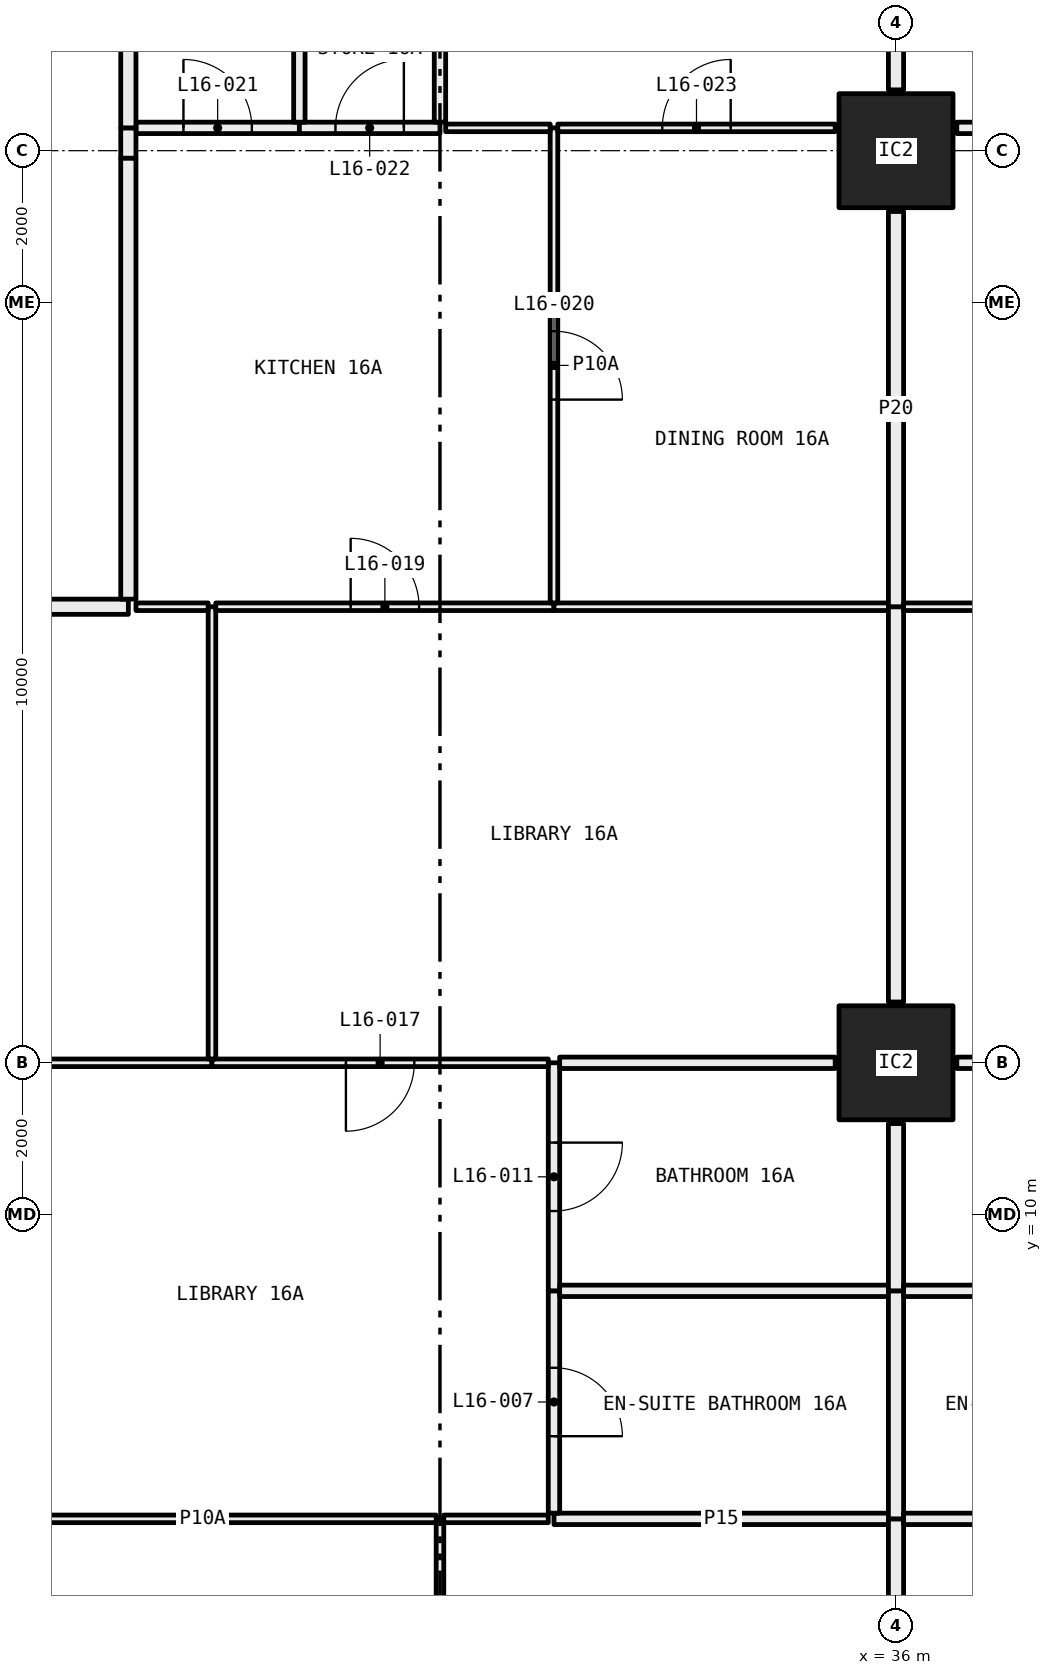
"""IFC4 building model, lengths in metres.
Left out: names, types, materials, properties, quantities, classifications, styles, units other than length and angle.
Written with IfcOpenShell. Run it as: python <this file> out.ifc"""

import sys

from ifc_helpers import new_model, si_unit, direction, frame, frame_2d, origin, origin_2d, place, context, subcontext, project, spatial, rectangle, hollow_rectangle, extrude, element, fill, save


model = new_model("IFC4")
c1 = context("Model", 3, precision=1e-05, world=origin(), true_north=direction((0.0, 1.0)))
c2 = subcontext(c1, "Body", "Model", "MODEL_VIEW")
j1 = project(units=[si_unit("LENGTHUNIT", "METRE"), si_unit("PLANEANGLEUNIT", "RADIAN")], contexts=[c1])
p1 = place(None, origin())
s1 = spatial("IfcSite", under=j1, at=p1, CompositionType="ELEMENT")
p2 = place(p1, origin())
s2 = spatial("IfcBuilding", under=s1, at=p2, CompositionType="ELEMENT")
p3 = place(p2, frame((0.0, 0.0, 67.95)))
s3 = spatial("IfcBuildingStorey", under=s2, at=p3, CompositionType="ELEMENT", Elevation=67.95)
for number, where, z_axis, x_axis in (
    (1, (36.0, 12.0, 0.0), (0.0, 0.0, 1.0), (1.0, 0.0, 0.0)),
    (2, (36.0, 24.0, 0.0), (0.0, 0.0, 1.0), (1.0, 0.0, 0.0)),
):
    element("IfcColumn", number, at=place(p3, frame(where, z_axis=z_axis, x_axis=x_axis)), inside=s3, PredefinedType="COLUMN", context=c2, shape_type="SweptSolid", body=[
        extrude(hollow_rectangle(XDim=1.5, YDim=1.5, WallThickness=0.065, at=origin_2d()), origin(), (0.0, 0.0, 1.0), 3.05),
    ])
p4 = place(p3, frame((30.0, 0.72, 0.0), z_axis=(0.0, 0.0, 1.0), x_axis=(0.0, 1.0, 0.0)))
e3 = element("IfcWall", 3, at=p4, inside=s3, PredefinedType="PARTITIONING", context=c2, shape_type="SweptSolid", body=[
    extrude(rectangle(XDim=5.28, YDim=0.1, at=frame_2d((2.64, 0.0))), origin(), (0.0, 0.0, 1.0), 3.05),
])
p5 = place(p4, frame((2.19, 0.0, 0.0)))
e4 = element("IfcOpeningElement", 4, at=p5, cuts=e3, PredefinedType="OPENING", context=c2, shape_type="SweptSolid", body=[
    extrude(rectangle(XDim=0.9, YDim=2.1, at=frame_2d((0.45, 1.05))), frame((0.0, 0.06, 0.0), z_axis=(0.0, -1.0, 0.0), x_axis=(1.0, 0.0, 0.0)), (0.0, 0.0, 1.0), 0.12),
])
p6 = place(p3, frame((29.95, 6.0, 0.0), z_axis=(0.0, 0.0, 1.0), x_axis=(-1.0, 0.0, 0.0)))
e5 = element("IfcWall", 5, at=p6, inside=s3, PredefinedType="PARTITIONING", context=c2, shape_type="SweptSolid", body=[
    extrude(rectangle(XDim=6.145, YDim=0.1, at=frame_2d((3.073, 0.0))), origin(), (0.0, 0.0, 1.0), 2.45),
])
p7 = place(p3, frame((31.425, 6.0, 0.0), z_axis=(0.0, 0.0, 1.0), x_axis=(-1.0, 0.0, 0.0)))
e6 = element("IfcWall", 6, at=p7, inside=s3, PredefinedType="PARTITIONING", context=c2, shape_type="SweptSolid", body=[
    extrude(rectangle(XDim=1.375, YDim=0.1, at=frame_2d((0.688, 0.0))), origin(), (0.0, 0.0, 1.0), 3.05),
])
p8 = place(p3, frame((35.9, 6.0, 0.0), z_axis=(0.0, 0.0, 1.0), x_axis=(-1.0, 0.0, 0.0)))
e7 = element("IfcWall", 7, at=p8, inside=s3, PredefinedType="PARTITIONING", context=c2, shape_type="SweptSolid", body=[
    extrude(rectangle(XDim=4.4, YDim=0.15, at=frame_2d((2.2, 0.0))), origin(), (0.0, 0.0, 1.0), 3.05),
])
p9 = place(p3, frame((36.0, 0.72, 0.0), z_axis=(0.0, 0.0, 1.0), x_axis=(0.0, 1.0, 0.0)))
e8 = element("IfcWall", 8, at=p9, inside=s3, PredefinedType="PARTITIONING", context=c2, shape_type="SweptSolid", body=[
    extrude(rectangle(XDim=5.28, YDim=0.2, at=frame_2d((2.64, 0.0))), origin(), (0.0, 0.0, 1.0), 2.45),
])
p10 = place(p3, frame((31.5, 6.075, 0.0), z_axis=(0.0, 0.0, 1.0), x_axis=(0.0, 1.0, 0.0)))
e9 = element("IfcWall", 9, at=p10, inside=s3, PredefinedType="PARTITIONING", context=c2, shape_type="SweptSolid", body=[
    extrude(rectangle(XDim=2.925, YDim=0.15, at=frame_2d((1.462, 0.0))), origin(), (0.0, 0.0, 1.0), 3.05),
])
p11 = place(p10, frame((1.012, 0.0, 0.0)))
e10 = element("IfcOpeningElement", 10, at=p11, cuts=e9, PredefinedType="OPENING", context=c2, shape_type="SweptSolid", body=[
    extrude(rectangle(XDim=0.9, YDim=2.1, at=frame_2d((0.45, 1.05))), frame((0.0, 0.085, 0.0), z_axis=(0.0, -1.0, 0.0), x_axis=(1.0, 0.0, 0.0)), (0.0, 0.0, 1.0), 0.17),
])
p12 = place(p3, frame((31.5, 9.0, 0.0), z_axis=(0.0, 0.0, 1.0), x_axis=(0.0, 1.0, 0.0)))
e11 = element("IfcWall", 11, at=p12, inside=s3, PredefinedType="PARTITIONING", context=c2, shape_type="SweptSolid", body=[
    extrude(rectangle(XDim=3.0, YDim=0.15, at=frame_2d((1.5, 0.0))), origin(), (0.0, 0.0, 1.0), 2.45),
])
p13 = place(p12, frame((1.05, 0.0, 0.0)))
e12 = element("IfcOpeningElement", 12, at=p13, cuts=e11, PredefinedType="OPENING", context=c2, shape_type="SweptSolid", body=[
    extrude(rectangle(XDim=0.9, YDim=2.1, at=frame_2d((0.45, 1.05))), frame((0.0, 0.085, 0.0), z_axis=(0.0, -1.0, 0.0), x_axis=(1.0, 0.0, 0.0)), (0.0, 0.0, 1.0), 0.17),
])
p14 = place(p3, frame((27.0, 12.0, 0.0), z_axis=(0.0, 0.0, 1.0), x_axis=(-1.0, 0.0, 0.0)))
e13 = element("IfcWall", 13, at=p14, inside=s3, PredefinedType="PARTITIONING", context=c2, shape_type="SweptSolid", body=[
    extrude(rectangle(XDim=2.2, YDim=0.1, at=frame_2d((1.1, 0.0))), origin(), (0.0, 0.0, 1.0), 2.45),
])
p15 = place(p3, frame((31.425, 12.0, 0.0), z_axis=(0.0, 0.0, 1.0), x_axis=(-1.0, 0.0, 0.0)))
e14 = element("IfcWall", 14, at=p15, inside=s3, PredefinedType="PARTITIONING", context=c2, shape_type="SweptSolid", body=[
    extrude(rectangle(XDim=4.425, YDim=0.1, at=frame_2d((2.212, 0.0))), origin(), (0.0, 0.0, 1.0), 2.45),
])
p16 = place(p15, frame((1.762, 0.0, 0.0)))
e15 = element("IfcOpeningElement", 15, at=p16, cuts=e14, PredefinedType="OPENING", context=c2, shape_type="SweptSolid", body=[
    extrude(rectangle(XDim=0.9, YDim=2.1, at=frame_2d((0.45, 1.05))), frame((0.0, 0.06, 0.0), z_axis=(0.0, -1.0, 0.0), x_axis=(1.0, 0.0, 0.0)), (0.0, 0.0, 1.0), 0.12),
])
p17 = place(p3, frame((35.9, 9.0, 0.0), z_axis=(0.0, 0.0, 1.0), x_axis=(-1.0, 0.0, 0.0)))
e16 = element("IfcWall", 16, at=p17, inside=s3, PredefinedType="PARTITIONING", context=c2, shape_type="SweptSolid", body=[
    extrude(rectangle(XDim=4.325, YDim=0.15, at=frame_2d((2.163, 0.0))), origin(), (0.0, 0.0, 1.0), 3.05),
])
p18 = place(p3, frame((36.0, 6.0, 0.0), z_axis=(0.0, 0.0, 1.0), x_axis=(0.0, 1.0, 0.0)))
e17 = element("IfcWall", 17, at=p18, inside=s3, PredefinedType="PARTITIONING", context=c2, shape_type="SweptSolid", body=[
    extrude(rectangle(XDim=3.0, YDim=0.2, at=frame_2d((1.5, 0.0))), origin(), (0.0, 0.0, 1.0), 2.45),
])
p19 = place(p3, frame((35.2, 12.0, 0.0), z_axis=(0.0, 0.0, 1.0), x_axis=(-1.0, 0.0, 0.0)))
e18 = element("IfcWall", 18, at=p19, inside=s3, PredefinedType="PARTITIONING", context=c2, shape_type="SweptSolid", body=[
    extrude(rectangle(XDim=3.625, YDim=0.15, at=frame_2d((1.812, 0.0))), origin(), (0.0, 0.0, 1.0), 2.45),
])
p20 = place(p3, frame((36.0, 9.0, 0.0), z_axis=(0.0, 0.0, 1.0), x_axis=(0.0, 1.0, 0.0)))
e19 = element("IfcWall", 19, at=p20, inside=s3, PredefinedType="PARTITIONING", context=c2, shape_type="SweptSolid", body=[
    extrude(rectangle(XDim=2.2, YDim=0.2, at=frame_2d((1.1, 0.0))), origin(), (0.0, 0.0, 1.0), 2.45),
])
p21 = place(p3, frame((27.0, 12.05, 0.0), z_axis=(0.0, 0.0, 1.0), x_axis=(0.0, 1.0, 0.0)))
e20 = element("IfcWall", 20, at=p21, inside=s3, PredefinedType="PARTITIONING", context=c2, shape_type="SweptSolid", body=[
    extrude(rectangle(XDim=5.95, YDim=0.1, at=frame_2d((2.975, 0.0))), origin(), (0.0, 0.0, 1.0), 2.45),
])
p22 = place(p3, frame((26.95, 18.0, 0.0), z_axis=(0.0, 0.0, 1.0), x_axis=(-1.0, 0.0, 0.0)))
e21 = element("IfcWall", 21, at=p22, inside=s3, PredefinedType="PARTITIONING", context=c2, shape_type="SweptSolid", body=[
    extrude(rectangle(XDim=0.95, YDim=0.1, at=frame_2d((0.475, 0.0))), origin(), (0.0, 0.0, 1.0), 3.05),
])
p23 = place(p3, frame((25.9, 18.0, 0.0), z_axis=(0.0, 0.0, 1.0), x_axis=(-1.0, 0.0, 0.0)))
e22 = element("IfcWall", 22, at=p23, inside=s3, PredefinedType="PARTITIONING", context=c2, shape_type="SweptSolid", body=[
    extrude(rectangle(XDim=7.9, YDim=0.2, at=frame_2d((3.95, 0.0))), origin(), (0.0, 0.0, 1.0), 3.05),
])
p24 = place(p3, frame((31.5, 18.0, 0.0), z_axis=(0.0, 0.0, 1.0), x_axis=(-1.0, 0.0, 0.0)))
e23 = element("IfcWall", 23, at=p24, inside=s3, PredefinedType="PARTITIONING", context=c2, shape_type="SweptSolid", body=[
    extrude(rectangle(XDim=4.45, YDim=0.1, at=frame_2d((2.225, 0.0))), origin(), (0.0, 0.0, 1.0), 3.05),
])
p25 = place(p24, frame((1.775, 0.0, 0.0)))
e24 = element("IfcOpeningElement", 24, at=p25, cuts=e23, PredefinedType="OPENING", context=c2, shape_type="SweptSolid", body=[
    extrude(rectangle(XDim=0.9, YDim=2.1, at=frame_2d((0.45, 1.05))), frame((0.0, 0.06, 0.0), z_axis=(0.0, -1.0, 0.0), x_axis=(1.0, 0.0, 0.0)), (0.0, 0.0, 1.0), 0.12),
])
p26 = place(p3, frame((35.9, 18.0, 0.0), z_axis=(0.0, 0.0, 1.0), x_axis=(-1.0, 0.0, 0.0)))
e25 = element("IfcWall", 25, at=p26, inside=s3, PredefinedType="PARTITIONING", context=c2, shape_type="SweptSolid", body=[
    extrude(rectangle(XDim=4.4, YDim=0.1, at=frame_2d((2.2, 0.0))), origin(), (0.0, 0.0, 1.0), 3.05),
])
p27 = place(p3, frame((36.0, 12.8, 0.0), z_axis=(0.0, 0.0, 1.0), x_axis=(0.0, 1.0, 0.0)))
e26 = element("IfcWall", 26, at=p27, inside=s3, PredefinedType="PARTITIONING", context=c2, shape_type="SweptSolid", body=[
    extrude(rectangle(XDim=5.2, YDim=0.2, at=frame_2d((2.6, 0.0))), origin(), (0.0, 0.0, 1.0), 2.45),
])
p28 = place(p3, frame((31.5, 18.05, 0.0), z_axis=(0.0, 0.0, 1.0), x_axis=(0.0, 1.0, 0.0)))
e27 = element("IfcWall", 27, at=p28, inside=s3, PredefinedType="PARTITIONING", context=c2, shape_type="SweptSolid", body=[
    extrude(rectangle(XDim=6.25, YDim=0.1, at=frame_2d((3.125, 0.0))), origin(), (0.0, 0.0, 1.0), 2.45),
])
p29 = place(p28, frame((2.675, 0.0, 0.0)))
e28 = element("IfcOpeningElement", 28, at=p29, cuts=e27, PredefinedType="OPENING", context=c2, shape_type="SweptSolid", body=[
    extrude(rectangle(XDim=0.9, YDim=2.1, at=frame_2d((0.45, 1.05))), frame((0.0, 0.06, 0.0), z_axis=(0.0, -1.0, 0.0), x_axis=(1.0, 0.0, 0.0)), (0.0, 0.0, 1.0), 0.12),
])
p30 = place(p3, frame((28.15, 24.3, 0.0), z_axis=(0.0, 0.0, 1.0), x_axis=(-1.0, 0.0, 0.0)))
e29 = element("IfcWall", 29, at=p30, inside=s3, PredefinedType="PARTITIONING", context=c2, shape_type="SweptSolid", body=[
    extrude(rectangle(XDim=2.15, YDim=0.15, at=frame_2d((1.075, 0.0))), origin(), (0.0, 0.0, 1.0), 3.05),
])
p31 = place(p30, frame((0.625, 0.0, 0.0)))
e30 = element("IfcOpeningElement", 30, at=p31, cuts=e29, PredefinedType="OPENING", context=c2, shape_type="SweptSolid", body=[
    extrude(rectangle(XDim=0.9, YDim=2.1, at=frame_2d((0.45, 1.05))), frame((0.0, 0.085, 0.0), z_axis=(0.0, -1.0, 0.0), x_axis=(1.0, 0.0, 0.0)), (0.0, 0.0, 1.0), 0.17),
])
p32 = place(p3, frame((30.0, 24.3, 0.0), z_axis=(0.0, 0.0, 1.0), x_axis=(-1.0, 0.0, 0.0)))
e31 = element("IfcWall", 31, at=p32, inside=s3, PredefinedType="PARTITIONING", context=c2, shape_type="SweptSolid", body=[
    extrude(rectangle(XDim=1.85, YDim=0.15, at=frame_2d((0.925, 0.0))), origin(), (0.0, 0.0, 1.0), 3.05),
])
p33 = place(p32, frame((0.475, 0.0, 0.0)))
e32 = element("IfcOpeningElement", 32, at=p33, cuts=e31, PredefinedType="OPENING", context=c2, shape_type="SweptSolid", body=[
    extrude(rectangle(XDim=0.9, YDim=2.1, at=frame_2d((0.45, 1.05))), frame((0.0, 0.085, 0.0), z_axis=(0.0, -1.0, 0.0), x_axis=(1.0, 0.0, 0.0)), (0.0, 0.0, 1.0), 0.17),
])
p34 = place(p3, frame((31.45, 24.3, 0.0), z_axis=(0.0, 0.0, 1.0), x_axis=(-1.0, 0.0, 0.0)))
e33 = element("IfcWall", 33, at=p34, inside=s3, PredefinedType="PARTITIONING", context=c2, shape_type="SweptSolid", body=[
    extrude(rectangle(XDim=1.375, YDim=0.1, at=frame_2d((0.688, 0.0))), origin(), (0.0, 0.0, 1.0), 3.05),
])
p35 = place(p3, frame((25.9, 24.3, 0.0), z_axis=(0.0, 0.0, 1.0), x_axis=(0.0, -1.0, 0.0)))
e34 = element("IfcWall", 34, at=p35, inside=s3, PredefinedType="PARTITIONING", context=c2, shape_type="SweptSolid", body=[
    extrude(rectangle(XDim=0.4, YDim=0.2, at=frame_2d((0.2, 0.0))), origin(), (0.0, 0.0, 1.0), 2.45),
])
p36 = place(p3, frame((25.9, 23.9, 0.0), z_axis=(0.0, 0.0, 1.0), x_axis=(0.0, -1.0, 0.0)))
e35 = element("IfcWall", 35, at=p36, inside=s3, PredefinedType="PARTITIONING", context=c2, shape_type="SweptSolid", body=[
    extrude(rectangle(XDim=5.8, YDim=0.2, at=frame_2d((2.9, 0.0))), origin(), (0.0, 0.0, 1.0), 3.05),
])
p37 = place(p3, frame((35.2, 24.3, 0.0), z_axis=(0.0, 0.0, 1.0), x_axis=(-1.0, 0.0, 0.0)))
e36 = element("IfcWall", 36, at=p37, inside=s3, PredefinedType="PARTITIONING", context=c2, shape_type="SweptSolid", body=[
    extrude(rectangle(XDim=3.65, YDim=0.1, at=frame_2d((1.825, 0.0))), origin(), (0.0, 0.0, 1.0), 3.05),
])
p38 = place(p37, frame((1.375, 0.0, 0.0)))
e37 = element("IfcOpeningElement", 37, at=p38, cuts=e36, PredefinedType="OPENING", context=c2, shape_type="SweptSolid", body=[
    extrude(rectangle(XDim=0.9, YDim=2.1, at=frame_2d((0.45, 1.05))), frame((0.0, 0.06, 0.0), z_axis=(0.0, -1.0, 0.0), x_axis=(1.0, 0.0, 0.0)), (0.0, 0.0, 1.0), 0.12),
])
p39 = place(p3, frame((36.0, 18.0, 0.0), z_axis=(0.0, 0.0, 1.0), x_axis=(0.0, 1.0, 0.0)))
e38 = element("IfcWall", 38, at=p39, inside=s3, PredefinedType="PARTITIONING", context=c2, shape_type="SweptSolid", body=[
    extrude(rectangle(XDim=5.2, YDim=0.2, at=frame_2d((2.6, 0.0))), origin(), (0.0, 0.0, 1.0), 2.45),
])
p40 = place(p3, frame((28.15, 24.375, 0.0), z_axis=(0.0, 0.0, 1.0), x_axis=(0.0, 1.0, 0.0)))
e39 = element("IfcWall", 39, at=p40, inside=s3, PredefinedType="PARTITIONING", context=c2, shape_type="SweptSolid", body=[
    extrude(rectangle(XDim=2.325, YDim=0.15, at=frame_2d((1.163, 0.0))), origin(), (0.0, 0.0, 1.0), 3.05),
])
p41 = place(p3, frame((25.9, 26.7, 0.0), z_axis=(0.0, 0.0, 1.0), x_axis=(0.0, -1.0, 0.0)))
e40 = element("IfcWall", 40, at=p41, inside=s3, PredefinedType="PARTITIONING", context=c2, shape_type="SweptSolid", body=[
    extrude(rectangle(XDim=2.4, YDim=0.2, at=frame_2d((1.2, 0.0))), origin(), (0.0, 0.0, 1.0), 3.05),
])
p42 = place(p3, frame((30.0, 24.375, 0.0), z_axis=(0.0, 0.0, 1.0), x_axis=(0.0, 1.0, 0.0)))
e41 = element("IfcWall", 41, at=p42, inside=s3, PredefinedType="PARTITIONING", context=c2, shape_type="SweptSolid", body=[
    extrude(rectangle(XDim=2.25, YDim=0.15, at=frame_2d((1.125, 0.0))), origin(), (0.0, 0.0, 1.0), 3.05),
])
p43 = place(p3, frame((36.0, 24.8, 0.0), z_axis=(0.0, 0.0, 1.0), x_axis=(0.0, 1.0, 0.0)))
e42 = element("IfcWall", 42, at=p43, inside=s3, PredefinedType="PARTITIONING", context=c2, shape_type="SweptSolid", body=[
    extrude(rectangle(XDim=1.75, YDim=0.2, at=frame_2d((0.875, 0.0))), origin(), (0.0, 0.0, 1.0), 2.45),
])
for number, where, z_axis, x_axis in (
    (43, (40.5, 6.0, 0.0), (0.0, 0.0, 1.0), (-1.0, 0.0, 0.0)),
    (44, (40.5, 9.0, 0.0), (0.0, 0.0, 1.0), (-1.0, 0.0, 0.0)),
):
    element("IfcWall", number, at=place(p3, frame(where, z_axis=z_axis, x_axis=x_axis)), inside=s3, PredefinedType="PARTITIONING", context=c2, shape_type="SweptSolid", body=[
        extrude(rectangle(XDim=4.4, YDim=0.15, at=frame_2d((2.2, 0.0))), origin(), (0.0, 0.0, 1.0), 3.05),
    ])
p44 = place(p3, frame((40.425, 12.0, 0.0), z_axis=(0.0, 0.0, 1.0), x_axis=(-1.0, 0.0, 0.0)))
e45 = element("IfcWall", 45, at=p44, inside=s3, PredefinedType="PARTITIONING", context=c2, shape_type="SweptSolid", body=[
    extrude(rectangle(XDim=3.625, YDim=0.15, at=frame_2d((1.812, 0.0))), origin(), (0.0, 0.0, 1.0), 2.45),
])
p45 = place(p3, frame((40.5, 18.0, 0.0), z_axis=(0.0, 0.0, 1.0), x_axis=(-1.0, 0.0, 0.0)))
e46 = element("IfcWall", 46, at=p45, inside=s3, PredefinedType="PARTITIONING", context=c2, shape_type="SweptSolid", body=[
    extrude(rectangle(XDim=4.4, YDim=0.1, at=frame_2d((2.2, 0.0))), origin(), (0.0, 0.0, 1.0), 3.05),
])
p46 = place(p45, frame((1.75, 0.0, 0.0)))
e47 = element("IfcOpeningElement", 47, at=p46, cuts=e46, PredefinedType="OPENING", context=c2, shape_type="SweptSolid", body=[
    extrude(rectangle(XDim=0.9, YDim=2.1, at=frame_2d((0.45, 1.05))), frame((0.0, 0.06, 0.0), z_axis=(0.0, -1.0, 0.0), x_axis=(1.0, 0.0, 0.0)), (0.0, 0.0, 1.0), 0.12),
])
p47 = place(p3, frame((38.4, 24.3, 0.0), z_axis=(0.0, 0.0, 1.0), x_axis=(-1.0, 0.0, 0.0)))
e48 = element("IfcWall", 48, at=p47, inside=s3, PredefinedType="PARTITIONING", context=c2, shape_type="SweptSolid", body=[
    extrude(rectangle(XDim=1.6, YDim=0.15, at=frame_2d((0.8, 0.0))), origin(), (0.0, 0.0, 1.0), 3.05),
])
p48 = place(p47, frame((0.35, 0.0, 0.0)))
e49 = element("IfcOpeningElement", 49, at=p48, cuts=e48, PredefinedType="OPENING", context=c2, shape_type="SweptSolid", body=[
    extrude(rectangle(XDim=0.9, YDim=2.1, at=frame_2d((0.45, 1.05))), frame((0.0, 0.085, 0.0), z_axis=(0.0, -1.0, 0.0), x_axis=(1.0, 0.0, 0.0)), (0.0, 0.0, 1.0), 0.17),
])
p49 = place(p11, frame((0.9, 0.0, 0.0), x_axis=(-1.0, 0.0, 0.0)))
e50 = element("IfcDoor", 50, at=p49, inside=s3, OperationType="SINGLE_SWING_LEFT", PredefinedType="DOOR", context=c2, shape_type="SweptSolid", body=[
    extrude(rectangle(XDim=0.9, YDim=2.1, at=frame_2d((0.45, 1.05))), frame((0.0, 0.025, 0.0), z_axis=(0.0, -1.0, 0.0), x_axis=(1.0, 0.0, 0.0)), (0.0, 0.0, 1.0), 0.05),
])
fill(e10, e50)
p50 = place(p13, frame((0.9, 0.0, 0.0), x_axis=(-1.0, 0.0, 0.0)))
e51 = element("IfcDoor", 51, at=p50, inside=s3, OperationType="SINGLE_SWING_RIGHT", PredefinedType="DOOR", context=c2, shape_type="SweptSolid", body=[
    extrude(rectangle(XDim=0.9, YDim=2.1, at=frame_2d((0.45, 1.05))), frame((0.0, 0.025, 0.0), z_axis=(0.0, -1.0, 0.0), x_axis=(1.0, 0.0, 0.0)), (0.0, 0.0, 1.0), 0.05),
])
fill(e12, e51)
p51 = place(p16, origin())
e52 = element("IfcDoor", 52, at=p51, inside=s3, OperationType="SINGLE_SWING_LEFT", PredefinedType="DOOR", context=c2, shape_type="SweptSolid", body=[
    extrude(rectangle(XDim=0.9, YDim=2.1, at=frame_2d((0.45, 1.05))), frame((0.0, 0.025, 0.0), z_axis=(0.0, -1.0, 0.0), x_axis=(1.0, 0.0, 0.0)), (0.0, 0.0, 1.0), 0.05),
])
fill(e15, e52)
p52 = place(p25, frame((0.9, 0.0, 0.0), x_axis=(-1.0, 0.0, 0.0)))
e53 = element("IfcDoor", 53, at=p52, inside=s3, OperationType="SINGLE_SWING_RIGHT", PredefinedType="DOOR", context=c2, shape_type="SweptSolid", body=[
    extrude(rectangle(XDim=0.9, YDim=2.1, at=frame_2d((0.45, 1.05))), frame((0.0, 0.025, 0.0), z_axis=(0.0, -1.0, 0.0), x_axis=(1.0, 0.0, 0.0)), (0.0, 0.0, 1.0), 0.05),
])
fill(e24, e53)
p53 = place(p29, frame((0.9, 0.0, 0.0), x_axis=(-1.0, 0.0, 0.0)))
e54 = element("IfcDoor", 54, at=p53, inside=s3, OperationType="SINGLE_SWING_LEFT", PredefinedType="DOOR", context=c2, shape_type="SweptSolid", body=[
    extrude(rectangle(XDim=0.9, YDim=2.1, at=frame_2d((0.45, 1.05))), frame((0.0, 0.025, 0.0), z_axis=(0.0, -1.0, 0.0), x_axis=(1.0, 0.0, 0.0)), (0.0, 0.0, 1.0), 0.05),
])
fill(e28, e54)
p54 = place(p31, frame((0.9, 0.0, 0.0), x_axis=(-1.0, 0.0, 0.0)))
e55 = element("IfcDoor", 55, at=p54, inside=s3, OperationType="SINGLE_SWING_RIGHT", PredefinedType="DOOR", context=c2, shape_type="SweptSolid", body=[
    extrude(rectangle(XDim=0.9, YDim=2.1, at=frame_2d((0.45, 1.05))), frame((0.0, 0.025, 0.0), z_axis=(0.0, -1.0, 0.0), x_axis=(1.0, 0.0, 0.0)), (0.0, 0.0, 1.0), 0.05),
])
fill(e30, e55)
p55 = place(p33, frame((0.9, 0.0, 0.0), x_axis=(-1.0, 0.0, 0.0)))
e56 = element("IfcDoor", 56, at=p55, inside=s3, OperationType="SINGLE_SWING_LEFT", PredefinedType="DOOR", context=c2, shape_type="SweptSolid", body=[
    extrude(rectangle(XDim=0.9, YDim=2.1, at=frame_2d((0.45, 1.05))), frame((0.0, 0.025, 0.0), z_axis=(0.0, -1.0, 0.0), x_axis=(1.0, 0.0, 0.0)), (0.0, 0.0, 1.0), 0.05),
])
fill(e32, e56)
p56 = place(p38, frame((0.9, 0.0, 0.0), x_axis=(-1.0, 0.0, 0.0)))
e57 = element("IfcDoor", 57, at=p56, inside=s3, OperationType="SINGLE_SWING_LEFT", PredefinedType="DOOR", context=c2, shape_type="SweptSolid", body=[
    extrude(rectangle(XDim=0.9, YDim=2.1, at=frame_2d((0.45, 1.05))), frame((0.0, 0.025, 0.0), z_axis=(0.0, -1.0, 0.0), x_axis=(1.0, 0.0, 0.0)), (0.0, 0.0, 1.0), 0.05),
])
fill(e37, e57)
save(model, sys.argv[1])
